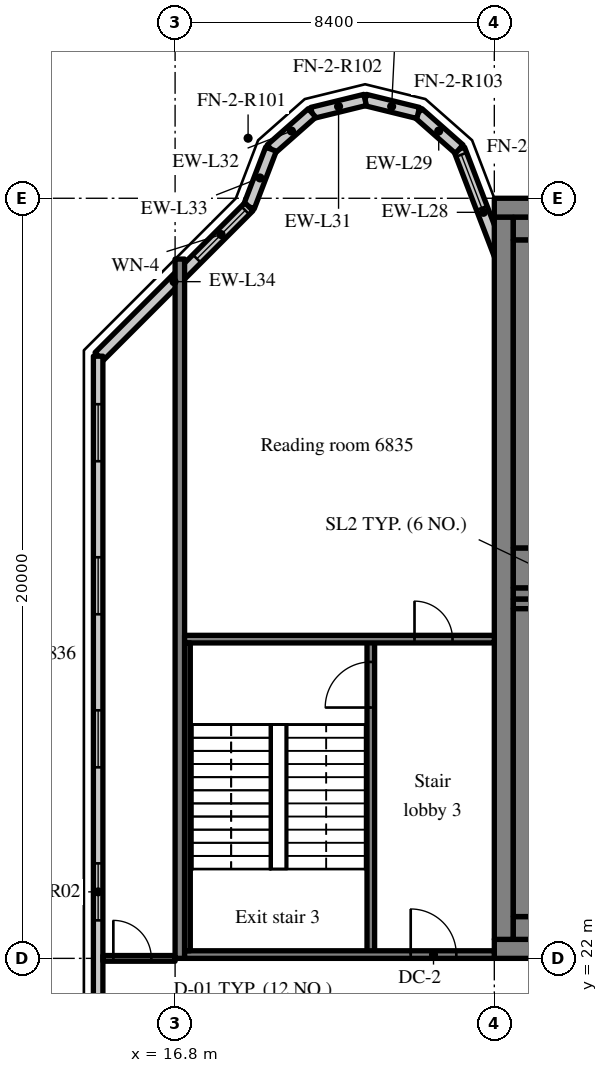
"""IFC4 building model, lengths in metres.
Left out: names, types, materials, properties, quantities, classifications, styles, units other than length and angle.
Written with IfcOpenShell. Run it as: python <this file> out.ifc"""

import sys

from ifc_helpers import new_model, si_unit, direction, frame, frame_2d, origin, place, context, subcontext, project, spatial, rectangle, extrude, source, transform, mapped, element, fill, save


model = new_model("IFC4")
c1 = context("Model", 3, precision=1e-05, world=origin(), true_north=direction((0.0, 1.0)))
c2 = subcontext(c1, "Body", "Model", "MODEL_VIEW")
j1 = project(units=[si_unit("LENGTHUNIT", "METRE"), si_unit("PLANEANGLEUNIT", "RADIAN")], contexts=[c1])
p1 = place(None, origin())
s1 = spatial("IfcSite", under=j1, at=p1, CompositionType="ELEMENT")
p2 = place(p1, origin())
s2 = spatial("IfcBuilding", under=s1, at=p2, CompositionType="ELEMENT")
p3 = place(p2, frame((0.0, 0.0, 285.7)))
s3 = spatial("IfcBuildingStorey", under=s2, at=p3, CompositionType="ELEMENT", Elevation=285.7)
m1 = source(origin(), c2, "Body", "SweptSolid", [
    extrude(rectangle(XDim=50.4, YDim=0.5, at=frame_2d((25.2, 0.0))), origin(), (0.0, 0.0, 1.0), 3.72),
])
p4 = place(p3, frame((25.2, 22.25, 0.0), z_axis=(0.0, 0.0, 1.0), x_axis=(1.0, 0.0, 0.0)))
e1 = element("IfcWall", 1, at=p4, inside=s3, PredefinedType="SHEAR", context=c2, shape_type="MappedRepresentation", body=[
    mapped(m1, transform((0.0, 0.0, 0.0), scale=1.0)),
])
m2 = source(origin(), c2, "Body", "SweptSolid", [
    extrude(rectangle(XDim=1.8, YDim=2.1, at=frame_2d((0.9, 1.05))), frame((0.0, 0.26, 0.0), z_axis=(0.0, -1.0, 0.0), x_axis=(1.0, 0.0, 0.0)), (0.0, 0.0, 1.0), 0.52),
])
p5 = place(p4, frame((15.9, 0.0, 0.0)))
e2 = element("IfcOpeningElement", 2, at=p5, cuts=e1, PredefinedType="OPENING", context=c2, shape_type="MappedRepresentation", body=[
    mapped(m2, transform((0.0, 0.0, 0.0), scale=1.0)),
])
m3 = source(origin(), c2, "Body", "SweptSolid", [
    extrude(rectangle(XDim=0.9, YDim=2.1, at=frame_2d((0.45, 1.05))), frame((0.0, 0.26, 0.0), z_axis=(0.0, -1.0, 0.0), x_axis=(1.0, 0.0, 0.0)), (0.0, 0.0, 1.0), 0.52),
])
p6 = place(p4, frame((21.525, 0.0, 0.0)))
e3 = element("IfcOpeningElement", 3, at=p6, cuts=e1, PredefinedType="OPENING", context=c2, shape_type="MappedRepresentation", body=[
    mapped(m3, transform((0.0, 0.0, 0.0), scale=1.0)),
])
p7 = place(p4, frame((32.7, 0.0, 0.0)))
e4 = element("IfcOpeningElement", 4, at=p7, cuts=e1, PredefinedType="OPENING", context=c2, shape_type="MappedRepresentation", body=[
    mapped(m2, transform((0.0, 0.0, 0.0), scale=1.0)),
])
m4 = source(origin(), c2, "Body", "SweptSolid", [
    extrude(rectangle(XDim=1.2, YDim=2.1, at=frame_2d((0.6, 1.05))), frame((0.0, 0.26, 0.0), z_axis=(0.0, -1.0, 0.0), x_axis=(1.0, 0.0, 0.0)), (0.0, 0.0, 1.0), 0.52),
])
p8 = place(p4, frame((6.5, 0.0, 0.0)))
e5 = element("IfcOpeningElement", 5, at=p8, cuts=e1, PredefinedType="OPENING", context=c2, shape_type="MappedRepresentation", body=[
    mapped(m4, transform((0.0, 0.0, 0.0), scale=1.0)),
])
p9 = place(p4, frame((47.975, 0.0, 0.0)))
e6 = element("IfcOpeningElement", 6, at=p9, cuts=e1, PredefinedType="OPENING", context=c2, shape_type="MappedRepresentation", body=[
    mapped(m4, transform((0.0, 0.0, 0.0), scale=1.0)),
])
p10 = place(p3, frame((25.2, 41.75, 0.0), z_axis=(0.0, 0.0, 1.0), x_axis=(1.0, 0.0, 0.0)))
e7 = element("IfcWall", 7, at=p10, inside=s3, PredefinedType="SHEAR", context=c2, shape_type="MappedRepresentation", body=[
    mapped(m1, transform((0.0, 0.0, 0.0), scale=1.0)),
])
m5 = source(origin(), c2, "Body", "SweptSolid", [
    extrude(rectangle(XDim=19.0, YDim=0.5, at=frame_2d((9.5, 0.0))), origin(), (0.0, 0.0, 1.0), 3.72),
])
p11 = place(p3, frame((25.45, 22.5, 0.0), z_axis=(0.0, 0.0, 1.0), x_axis=(0.0, 1.0, 0.0)))
e8 = element("IfcWall", 8, at=p11, inside=s3, PredefinedType="SHEAR", context=c2, shape_type="MappedRepresentation", body=[
    mapped(m5, transform((0.0, 0.0, 0.0), scale=1.0)),
])
m6 = source(origin(), c2, "Body", "SweptSolid", [
    extrude(rectangle(XDim=7.75, YDim=0.3, at=frame_2d((3.875, 0.0))), origin(), (0.0, 0.0, 1.0), 3.72),
])
p12 = place(p3, frame((25.7, 31.6, 0.0), z_axis=(0.0, 0.0, 1.0), x_axis=(1.0, 0.0, 0.0)))
e9 = element("IfcWall", 9, at=p12, inside=s3, PredefinedType="SHEAR", context=c2, shape_type="MappedRepresentation", body=[
    mapped(m6, transform((0.0, 0.0, 0.0), scale=1.0)),
])
m7 = source(origin(), c2, "Body", "SweptSolid", [
    extrude(rectangle(XDim=1.1, YDim=2.1, at=frame_2d((0.55, 1.05))), frame((0.0, 0.16, 0.0), z_axis=(0.0, -1.0, 0.0), x_axis=(1.0, 0.0, 0.0)), (0.0, 0.0, 1.0), 0.32),
])
p13 = place(p12, frame((6.05, 0.0, 0.0)))
e10 = element("IfcOpeningElement", 10, at=p13, cuts=e9, PredefinedType="OPENING", context=c2, shape_type="MappedRepresentation", body=[
    mapped(m7, transform((0.0, 0.0, 0.0), scale=1.0)),
])
m8 = source(origin(), c2, "Body", "SweptSolid", [
    extrude(rectangle(XDim=18.4, YDim=0.25, at=frame_2d((9.2, 0.0))), origin(), (0.0, 0.0, 1.0), 3.72),
])
p14 = place(p3, frame((16.925, 22.0, 0.0), z_axis=(0.0, 0.0, 1.0), x_axis=(0.0, 1.0, 0.0)))
e11 = element("IfcWall", 11, at=p14, inside=s3, PredefinedType="SHEAR", context=c2, shape_type="MappedRepresentation", body=[
    mapped(m8, transform((0.0, 0.0, 0.0), scale=1.0)),
])
m9 = source(origin(), c2, "Body", "SweptSolid", [
    extrude(rectangle(XDim=3.559, YDim=0.3, at=frame_2d((1.78, 0.0))), origin(), (0.0, 0.0, 1.0), 3.72),
])
p15 = place(p3, frame((25.55, 39.969, 0.0), z_axis=(0.0, 0.0, 1.0), x_axis=(-0.35779745313, 0.933799219604, 0.0)))
e12 = element("IfcWall", 12, at=p15, inside=s3, PredefinedType="SOLIDWALL", context=c2, shape_type="MappedRepresentation", body=[
    mapped(m9, transform((0.0, 0.0, 0.0), scale=1.0)),
])
m10 = source(origin(), c2, "Body", "SweptSolid", [
    extrude(rectangle(XDim=1.5, YDim=2.0, at=frame_2d((0.75, 1.0))), frame((0.0, 0.16, 0.0), z_axis=(0.0, -1.0, 0.0), x_axis=(1.0, 0.0, 0.0)), (0.0, 0.0, 1.0), 0.32),
])
p16 = place(p15, frame((1.903, 0.0, 0.9)))
e13 = element("IfcOpeningElement", 13, at=p16, cuts=e12, PredefinedType="OPENING", context=c2, shape_type="MappedRepresentation", body=[
    mapped(m10, transform((0.0, 0.0, 0.0), scale=1.0)),
])
m11 = source(origin(), c2, "Body", "SweptSolid", [
    extrude(rectangle(XDim=1.44, YDim=0.3, at=frame_2d((0.72, 0.0))), origin(), (0.0, 0.0, 1.0), 3.72),
])
p17 = place(p3, frame((24.277, 43.292, 0.0), z_axis=(0.0, 0.0, 1.0), x_axis=(-0.749649827867, 0.661834673902, 0.0)))
e14 = element("IfcWall", 14, at=p17, inside=s3, PredefinedType="SOLIDWALL", context=c2, shape_type="MappedRepresentation", body=[
    mapped(m11, transform((0.0, 0.0, 0.0), scale=1.0)),
])
m12 = source(origin(), c2, "Body", "SweptSolid", [
    extrude(rectangle(XDim=1.438, YDim=0.3, at=frame_2d((0.719, 0.0))), origin(), (0.0, 0.0, 1.0), 3.72),
])
p18 = place(p3, frame((23.197, 44.245, 0.0), z_axis=(0.0, 0.0, 1.0), x_axis=(-0.971152283879, 0.238460146601, 0.0)))
e15 = element("IfcWall", 15, at=p18, inside=s3, PredefinedType="SOLIDWALL", context=c2, shape_type="MappedRepresentation", body=[
    mapped(m12, transform((0.0, 0.0, 0.0), scale=1.0)),
])
m13 = source(origin(), c2, "Body", "SweptSolid", [
    extrude(rectangle(XDim=1.439, YDim=0.3, at=frame_2d((0.719, 0.0))), origin(), (0.0, 0.0, 1.0), 3.72),
])
p19 = place(p3, frame((21.8, 44.588, 0.0), z_axis=(0.0, 0.0, 1.0), x_axis=(-0.971161932466, -0.238420848351, 0.0)))
e16 = element("IfcWall", 16, at=p19, inside=s3, PredefinedType="SOLIDWALL", context=c2, shape_type="MappedRepresentation", body=[
    mapped(m13, transform((0.0, 0.0, 0.0), scale=1.0)),
])
m14 = source(origin(), c2, "Body", "SweptSolid", [
    extrude(rectangle(XDim=1.44, YDim=0.3, at=frame_2d((0.72, 0.0))), origin(), (0.0, 0.0, 1.0), 3.72),
])
p20 = place(p3, frame((20.403, 44.245, 0.0), z_axis=(0.0, 0.0, 1.0), x_axis=(-0.74957555648, -0.661918790432, 0.0)))
e17 = element("IfcWall", 17, at=p20, inside=s3, PredefinedType="SOLIDWALL", context=c2, shape_type="MappedRepresentation", body=[
    mapped(m14, transform((0.0, 0.0, 0.0), scale=1.0)),
])
m15 = source(origin(), c2, "Body", "SweptSolid", [
    extrude(rectangle(XDim=1.622, YDim=0.3, at=frame_2d((0.811, 0.0))), origin(), (0.0, 0.0, 1.0), 3.72),
])
p21 = place(p3, frame((19.323, 43.292, 0.0), z_axis=(0.0, 0.0, 1.0), x_axis=(-0.357778527068, -0.933806471154, 0.0)))
e18 = element("IfcWall", 18, at=p21, inside=s3, PredefinedType="SOLIDWALL", context=c2, shape_type="MappedRepresentation", body=[
    mapped(m15, transform((0.0, 0.0, 0.0), scale=1.0)),
])
m16 = source(origin(), c2, "Body", "SweptSolid", [
    extrude(rectangle(XDim=5.576, YDim=0.3, at=frame_2d((2.788, 0.0))), origin(), (0.0, 0.0, 1.0), 3.72),
])
p22 = place(p3, frame((18.743, 41.777, 0.0), z_axis=(0.0, 0.0, 1.0), x_axis=(-0.707106781187, -0.707106781187, 0.0)))
e19 = element("IfcWall", 19, at=p22, inside=s3, PredefinedType="SOLIDWALL", context=c2, shape_type="MappedRepresentation", body=[
    mapped(m16, transform((0.0, 0.0, 0.0), scale=1.0)),
])
m17 = source(origin(), c2, "Body", "SweptSolid", [
    extrude(rectangle(XDim=1.8, YDim=1.5, at=frame_2d((0.9, 0.75))), frame((0.0, 0.16, 0.0), z_axis=(0.0, -1.0, 0.0), x_axis=(1.0, 0.0, 0.0)), (0.0, 0.0, 1.0), 0.32),
])
p23 = place(p22, frame((0.135, 0.0, 0.9)))
e20 = element("IfcOpeningElement", 20, at=p23, cuts=e19, PredefinedType="OPENING", context=c2, shape_type="MappedRepresentation", body=[
    mapped(m17, transform((0.0, 0.0, 0.0), scale=1.0)),
])
m18 = source(origin(), c2, "Body", "SweptSolid", [
    extrude(rectangle(XDim=28.189, YDim=0.25, at=frame_2d((14.095, 0.0))), origin(), (0.0, 0.0, 1.0), 3.72),
])
p24 = place(p3, frame((14.775, 37.845, 0.0), z_axis=(0.0, 0.0, 1.0), x_axis=(0.0, -1.0, 0.0)))
e21 = element("IfcWall", 21, at=p24, inside=s3, PredefinedType="SOLIDWALL", context=c2, shape_type="MappedRepresentation", body=[
    mapped(m18, transform((0.0, 0.0, 0.0), scale=1.0)),
])
m19 = source(origin(), c2, "Body", "SweptSolid", [
    extrude(rectangle(XDim=1.5, YDim=1.5, at=frame_2d((0.75, 0.75))), frame((0.0, 0.135, 0.0), z_axis=(0.0, -1.0, 0.0), x_axis=(1.0, 0.0, 0.0)), (0.0, 0.0, 1.0), 0.27),
])
p25 = place(p24, frame((1.263, 0.0, 0.9)))
e22 = element("IfcOpeningElement", 22, at=p25, cuts=e21, PredefinedType="OPENING", context=c2, shape_type="MappedRepresentation", body=[
    mapped(m19, transform((0.0, 0.0, 0.0), scale=1.0)),
])
p26 = place(p24, frame((5.291, 0.0, 0.9)))
e23 = element("IfcOpeningElement", 23, at=p26, cuts=e21, PredefinedType="OPENING", context=c2, shape_type="MappedRepresentation", body=[
    mapped(m19, transform((0.0, 0.0, 0.0), scale=1.0)),
])
p27 = place(p24, frame((9.318, 0.0, 0.9)))
e24 = element("IfcOpeningElement", 24, at=p27, cuts=e21, PredefinedType="OPENING", context=c2, shape_type="MappedRepresentation", body=[
    mapped(m19, transform((0.0, 0.0, 0.0), scale=1.0)),
])
p28 = place(p24, frame((13.345, 0.0, 0.9)))
e25 = element("IfcOpeningElement", 25, at=p28, cuts=e21, PredefinedType="OPENING", context=c2, shape_type="MappedRepresentation", body=[
    mapped(m19, transform((0.0, 0.0, 0.0), scale=1.0)),
])
p29 = place(p24, frame((17.372, 0.0, 0.9)))
e26 = element("IfcOpeningElement", 26, at=p29, cuts=e21, PredefinedType="OPENING", context=c2, shape_type="MappedRepresentation", body=[
    mapped(m19, transform((0.0, 0.0, 0.0), scale=1.0)),
])
p30 = place(p24, frame((21.399, 0.0, 0.9)))
e27 = element("IfcOpeningElement", 27, at=p30, cuts=e21, PredefinedType="OPENING", context=c2, shape_type="MappedRepresentation", body=[
    mapped(m19, transform((0.0, 0.0, 0.0), scale=1.0)),
])
p31 = place(p24, frame((25.426, 0.0, 0.9)))
e28 = element("IfcOpeningElement", 28, at=p31, cuts=e21, PredefinedType="OPENING", context=c2, shape_type="MappedRepresentation", body=[
    mapped(m19, transform((0.0, 0.0, 0.0), scale=1.0)),
])
m20 = source(origin(), c2, "Body", "SweptSolid", [
    extrude(rectangle(XDim=8.3, YDim=0.2, at=frame_2d((4.15, 0.0))), origin(), (0.0, 0.0, 1.0), 3.72),
])
p32 = place(p3, frame((21.95, 22.1, 0.0), z_axis=(0.0, 0.0, 1.0), x_axis=(0.0, 1.0, 0.0)))
e29 = element("IfcWall", 29, at=p32, inside=s3, PredefinedType="SOLIDWALL", context=c2, shape_type="MappedRepresentation", body=[
    mapped(m20, transform((0.0, 0.0, 0.0), scale=1.0)),
])
m21 = source(origin(), c2, "Body", "SweptSolid", [
    extrude(rectangle(XDim=1.2, YDim=2.1, at=frame_2d((0.6, 1.05))), frame((0.0, 0.11, 0.0), z_axis=(0.0, -1.0, 0.0), x_axis=(1.0, 0.0, 0.0)), (0.0, 0.0, 1.0), 0.22),
])
p33 = place(p32, frame((6.5, 0.0, 0.0)))
e30 = element("IfcOpeningElement", 30, at=p33, cuts=e29, PredefinedType="OPENING", context=c2, shape_type="MappedRepresentation", body=[
    mapped(m21, transform((0.0, 0.0, 0.0), scale=1.0)),
])
m22 = source(origin(), c2, "Body", "SweptSolid", [
    extrude(rectangle(XDim=8.15, YDim=0.2, at=frame_2d((4.075, 0.0))), origin(), (0.0, 0.0, 1.0), 3.72),
])
p34 = place(p3, frame((17.05, 22.1, 0.0), z_axis=(0.0, 0.0, 1.0), x_axis=(1.0, 0.0, 0.0)))
e31 = element("IfcWall", 31, at=p34, inside=s3, PredefinedType="SOLIDWALL", context=c2, shape_type="MappedRepresentation", body=[
    mapped(m22, transform((0.0, 0.0, 0.0), scale=1.0)),
])
p35 = place(p34, frame((5.95, 0.0, 0.0)))
e32 = element("IfcOpeningElement", 32, at=p35, cuts=e31, PredefinedType="OPENING", context=c2, shape_type="MappedRepresentation", body=[
    mapped(m21, transform((0.0, 0.0, 0.0), scale=1.0)),
])
p36 = place(p3, frame((17.05, 30.4, 0.0), z_axis=(0.0, 0.0, 1.0), x_axis=(1.0, 0.0, 0.0)))
e33 = element("IfcWall", 33, at=p36, inside=s3, PredefinedType="SOLIDWALL", context=c2, shape_type="MappedRepresentation", body=[
    mapped(m22, transform((0.0, 0.0, 0.0), scale=1.0)),
])
m23 = source(origin(), c2, "Body", "SweptSolid", [
    extrude(rectangle(XDim=1.0, YDim=2.1, at=frame_2d((0.5, 1.05))), frame((0.0, 0.11, 0.0), z_axis=(0.0, -1.0, 0.0), x_axis=(1.0, 0.0, 0.0)), (0.0, 0.0, 1.0), 0.22),
])
p37 = place(p36, frame((6.05, 0.0, 0.0)))
e34 = element("IfcOpeningElement", 34, at=p37, cuts=e33, PredefinedType="OPENING", context=c2, shape_type="MappedRepresentation", body=[
    mapped(m23, transform((0.0, 0.0, 0.0), scale=1.0)),
])
m24 = source(origin(), c2, "Body", "SweptSolid", [
    extrude(rectangle(XDim=5.25, YDim=0.6, at=frame_2d((2.625, 0.0))), origin(), (0.0, 0.0, 1.0), 3.72),
])
p38 = place(p3, frame((25.7, 22.8, 0.0), z_axis=(0.0, 0.0, 1.0), x_axis=(1.0, 0.0, 0.0)))
e35 = element("IfcWall", 35, at=p38, inside=s3, PredefinedType="SOLIDWALL", context=c2, shape_type="MappedRepresentation", body=[
    mapped(m24, transform((0.0, 0.0, 0.0), scale=1.0)),
])
m25 = source(origin(), c2, "Body", "SweptSolid", [
    extrude(rectangle(XDim=5.25, YDim=0.25, at=frame_2d((2.625, 0.0))), origin(), (0.0, 0.0, 1.0), 3.72),
])
p39 = place(p3, frame((25.7, 31.325, 0.0), z_axis=(0.0, 0.0, 1.0), x_axis=(1.0, 0.0, 0.0)))
e36 = element("IfcWall", 36, at=p39, inside=s3, PredefinedType="SOLIDWALL", context=c2, shape_type="MappedRepresentation", body=[
    mapped(m25, transform((0.0, 0.0, 0.0), scale=1.0)),
])
m26 = source(origin(), c2, "Body", "SweptSolid", [
    extrude(rectangle(XDim=8.1, YDim=0.6, at=frame_2d((4.05, 0.0))), origin(), (0.0, 0.0, 1.0), 3.72),
])
p40 = place(p3, frame((26.0, 23.1, 0.0), z_axis=(0.0, 0.0, 1.0), x_axis=(0.0, 1.0, 0.0)))
e37 = element("IfcWall", 37, at=p40, inside=s3, PredefinedType="SOLIDWALL", context=c2, shape_type="MappedRepresentation", body=[
    mapped(m26, transform((0.0, 0.0, 0.0), scale=1.0)),
])
m27 = source(origin(), c2, "Body", "SweptSolid", [
    extrude(rectangle(XDim=8.1, YDim=0.15, at=frame_2d((4.05, 0.0))), origin(), (0.0, 0.0, 1.0), 3.72),
])
p41 = place(p3, frame((17.125, 22.2, 0.0), z_axis=(0.0, 0.0, 1.0), x_axis=(0.0, 1.0, 0.0)))
e38 = element("IfcWall", 38, at=p41, inside=s3, PredefinedType="SOLIDWALL", context=c2, shape_type="MappedRepresentation", body=[
    mapped(m27, transform((0.0, 0.0, 0.0), scale=1.0)),
])
p42 = place(p3, frame((25.7, 41.2, 0.0), z_axis=(0.0, 0.0, 1.0), x_axis=(1.0, 0.0, 0.0)))
e39 = element("IfcWall", 39, at=p42, inside=s3, PredefinedType="SOLIDWALL", context=c2, shape_type="MappedRepresentation", body=[
    mapped(m24, transform((0.0, 0.0, 0.0), scale=1.0)),
])
m28 = source(origin(), c2, "Body", "SweptSolid", [
    extrude(rectangle(XDim=5.25, YDim=1.05, at=frame_2d((2.625, 0.0))), origin(), (0.0, 0.0, 1.0), 3.72),
])
p43 = place(p3, frame((25.7, 32.275, 0.0), z_axis=(0.0, 0.0, 1.0), x_axis=(1.0, 0.0, 0.0)))
e40 = element("IfcWall", 40, at=p43, inside=s3, PredefinedType="SOLIDWALL", context=c2, shape_type="MappedRepresentation", body=[
    mapped(m28, transform((0.0, 0.0, 0.0), scale=1.0)),
])
p44 = place(p3, frame((26.0, 32.8, 0.0), z_axis=(0.0, 0.0, 1.0), x_axis=(0.0, 1.0, 0.0)))
e41 = element("IfcWall", 41, at=p44, inside=s3, PredefinedType="SOLIDWALL", context=c2, shape_type="MappedRepresentation", body=[
    mapped(m26, transform((0.0, 0.0, 0.0), scale=1.0)),
])
m29 = source(origin(), c2, "Body", "SweptSolid", [
    extrude(rectangle(XDim=1.9, YDim=0.15, at=frame_2d((0.95, 0.0))), origin(), (0.0, 0.0, 1.0), 3.02),
])
p45 = place(p3, frame((14.9, 22.0, 0.0), z_axis=(0.0, 0.0, 1.0), x_axis=(1.0, 0.0, 0.0)))
e42 = element("IfcWall", 42, at=p45, inside=s3, PredefinedType="PARTITIONING", context=c2, shape_type="MappedRepresentation", body=[
    mapped(m29, transform((0.0, 0.0, 0.0), scale=1.0)),
])
m30 = source(origin(), c2, "Body", "SweptSolid", [
    extrude(rectangle(XDim=1.0, YDim=2.1, at=frame_2d((0.5, 1.05))), frame((0.0, 0.085, 0.0), z_axis=(0.0, -1.0, 0.0), x_axis=(1.0, 0.0, 0.0)), (0.0, 0.0, 1.0), 0.17),
])
p46 = place(p45, frame((0.275, 0.0, 0.0)))
e43 = element("IfcOpeningElement", 43, at=p46, cuts=e42, PredefinedType="OPENING", context=c2, shape_type="MappedRepresentation", body=[
    mapped(m30, transform((0.0, 0.0, 0.0), scale=1.0)),
])
m31 = source(origin(), c2, "Body", "SweptSolid", [
    extrude(rectangle(XDim=1.5, YDim=2.0, at=frame_2d((0.75, 1.0))), frame((0.0, 0.03, 0.0), z_axis=(0.0, -1.0, 0.0), x_axis=(1.0, 0.0, 0.0)), (0.0, 0.0, 1.0), 0.06),
])
p47 = place(p16, origin())
e44 = element("IfcWindow", 44, at=p47, inside=s3, PartitioningType="SINGLE_PANEL", PredefinedType="WINDOW", context=c2, shape_type="MappedRepresentation", body=[
    mapped(m31, transform((0.0, 0.0, 0.0), scale=1.0)),
])
fill(e13, e44)
m32 = source(origin(), c2, "Body", "SweptSolid", [
    extrude(rectangle(XDim=1.8, YDim=1.5, at=frame_2d((0.9, 0.75))), frame((0.0, 0.03, 0.0), z_axis=(0.0, -1.0, 0.0), x_axis=(1.0, 0.0, 0.0)), (0.0, 0.0, 1.0), 0.06),
])
p48 = place(p23, origin())
e45 = element("IfcWindow", 45, at=p48, inside=s3, PartitioningType="SINGLE_PANEL", PredefinedType="WINDOW", context=c2, shape_type="MappedRepresentation", body=[
    mapped(m32, transform((0.0, 0.0, 0.0), scale=1.0)),
])
fill(e20, e45)
m33 = source(origin(), c2, "Body", "SweptSolid", [
    extrude(rectangle(XDim=1.5, YDim=1.5, at=frame_2d((0.75, 0.75))), frame((0.0, 0.03, 0.0), z_axis=(0.0, -1.0, 0.0), x_axis=(1.0, 0.0, 0.0)), (0.0, 0.0, 1.0), 0.06),
])
p49 = place(p25, origin())
e46 = element("IfcWindow", 46, at=p49, inside=s3, PartitioningType="SINGLE_PANEL", PredefinedType="WINDOW", context=c2, shape_type="MappedRepresentation", body=[
    mapped(m33, transform((0.0, 0.0, 0.0), scale=1.0)),
])
fill(e22, e46)
p50 = place(p26, origin())
e47 = element("IfcWindow", 47, at=p50, inside=s3, PartitioningType="SINGLE_PANEL", PredefinedType="WINDOW", context=c2, shape_type="MappedRepresentation", body=[
    mapped(m33, transform((0.0, 0.0, 0.0), scale=1.0)),
])
fill(e23, e47)
p51 = place(p27, origin())
e48 = element("IfcWindow", 48, at=p51, inside=s3, PartitioningType="SINGLE_PANEL", PredefinedType="WINDOW", context=c2, shape_type="MappedRepresentation", body=[
    mapped(m33, transform((0.0, 0.0, 0.0), scale=1.0)),
])
fill(e24, e48)
p52 = place(p28, origin())
e49 = element("IfcWindow", 49, at=p52, inside=s3, PartitioningType="SINGLE_PANEL", PredefinedType="WINDOW", context=c2, shape_type="MappedRepresentation", body=[
    mapped(m33, transform((0.0, 0.0, 0.0), scale=1.0)),
])
fill(e25, e49)
m34 = source(origin(), c2, "Body", "SweptSolid", [
    extrude(rectangle(XDim=1.2, YDim=2.1, at=frame_2d((0.6, 1.05))), frame((0.0, 0.025, 0.0), z_axis=(0.0, -1.0, 0.0), x_axis=(1.0, 0.0, 0.0)), (0.0, 0.0, 1.0), 0.05),
])
p53 = place(p33, origin())
e50 = element("IfcDoor", 50, at=p53, inside=s3, OperationType="SINGLE_SWING_LEFT", PredefinedType="DOOR", context=c2, shape_type="MappedRepresentation", body=[
    mapped(m34, transform((0.0, 0.0, 0.0), scale=1.0)),
])
fill(e30, e50)
p54 = place(p35, origin())
e51 = element("IfcDoor", 51, at=p54, inside=s3, OperationType="SINGLE_SWING_LEFT", PredefinedType="DOOR", context=c2, shape_type="MappedRepresentation", body=[
    mapped(m34, transform((0.0, 0.0, 0.0), scale=1.0)),
])
fill(e32, e51)
m35 = source(origin(), c2, "Body", "SweptSolid", [
    extrude(rectangle(XDim=1.0, YDim=2.1, at=frame_2d((0.5, 1.05))), frame((0.0, 0.025, 0.0), z_axis=(0.0, -1.0, 0.0), x_axis=(1.0, 0.0, 0.0)), (0.0, 0.0, 1.0), 0.05),
])
p55 = place(p37, origin())
e52 = element("IfcDoor", 52, at=p55, inside=s3, OperationType="SINGLE_SWING_LEFT", PredefinedType="DOOR", context=c2, shape_type="MappedRepresentation", body=[
    mapped(m35, transform((0.0, 0.0, 0.0), scale=1.0)),
])
fill(e34, e52)
p56 = place(p46, origin())
e53 = element("IfcDoor", 53, at=p56, inside=s3, OperationType="SINGLE_SWING_LEFT", PredefinedType="DOOR", context=c2, shape_type="MappedRepresentation", body=[
    mapped(m35, transform((0.0, 0.0, 0.0), scale=1.0)),
])
fill(e43, e53)
save(model, sys.argv[1])
